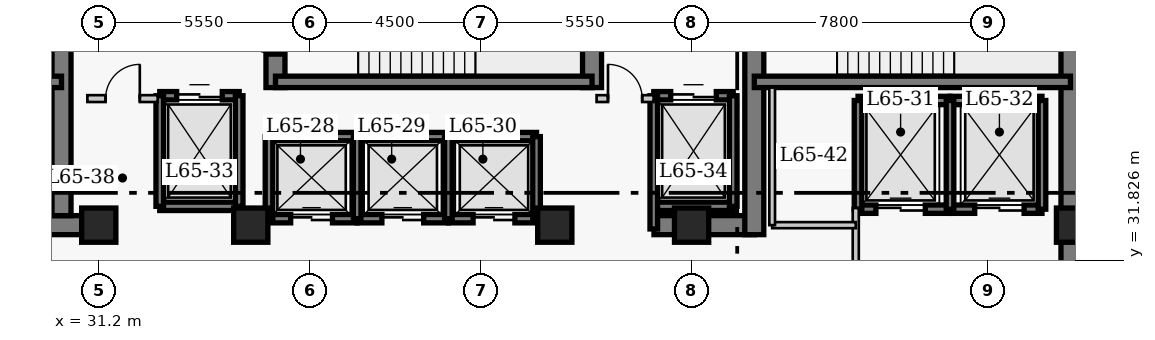
"""IFC4 building model, lengths in metres.
Left out: names, types, materials, properties, quantities, classifications, styles, units other than length and angle.
Written with IfcOpenShell. Run it as: python <this file> out.ifc"""

import sys

from ifc_helpers import new_model, si_unit, direction, frame, frame_2d, origin, origin_2d, place, context, subcontext, project, spatial, rectangle, extrude, element, fill, save


model = new_model("IFC4")
c1 = context("Model", 3, precision=1e-05, world=origin(), true_north=direction((0.0, 1.0)))
c2 = subcontext(c1, "Body", "Model", "MODEL_VIEW")
j1 = project(units=[si_unit("LENGTHUNIT", "METRE"), si_unit("PLANEANGLEUNIT", "RADIAN")], contexts=[c1])
p1 = place(None, origin())
s1 = spatial("IfcSite", under=j1, at=p1, CompositionType="ELEMENT")
p2 = place(p1, origin())
s2 = spatial("IfcBuilding", under=s1, at=p2, CompositionType="ELEMENT")
p3 = place(p2, frame((0.0, 0.0, 261.4)))
s3 = spatial("IfcBuildingStorey", under=s2, at=p3, CompositionType="ELEMENT", Elevation=261.4)
p4 = place(p3, frame((56.77, 27.05, 0.0), z_axis=(0.0, 0.0, 1.0), x_axis=(0.0, 1.0, 0.0)))
e1 = element("IfcWall", 1, at=p4, inside=s3, PredefinedType="SHEAR", context=c2, shape_type="SweptSolid", body=[
    extrude(rectangle(XDim=13.52, YDim=0.5, at=frame_2d((6.76, 0.0))), origin(), (0.0, 0.0, 1.0), 4.0),
])
p5 = place(p3, frame((28.45, 32.75, 0.0), z_axis=(0.0, 0.0, 1.0), x_axis=(1.0, 0.0, 0.0)))
e2 = element("IfcWall", 2, at=p5, inside=s3, PredefinedType="SHEAR", context=c2, shape_type="SweptSolid", body=[
    extrude(rectangle(XDim=2.4, YDim=0.5, at=frame_2d((1.2, 0.0))), origin(), (0.0, 0.0, 1.0), 4.0),
])
p6 = place(p3, frame((45.81, 32.75, 0.0), z_axis=(0.0, 0.0, 1.0), x_axis=(1.0, 0.0, 0.0)))
e3 = element("IfcWall", 3, at=p6, inside=s3, PredefinedType="SHEAR", context=c2, shape_type="SweptSolid", body=[
    extrude(rectangle(XDim=2.64, YDim=0.5, at=frame_2d((1.32, 0.0))), origin(), (0.0, 0.0, 1.0), 4.0),
])
p7 = place(p3, frame((30.22, 33.0, 0.0), z_axis=(0.0, 0.0, 1.0), x_axis=(0.0, 1.0, 0.0)))
e4 = element("IfcWall", 4, at=p7, inside=s3, PredefinedType="SHEAR", context=c2, shape_type="SweptSolid", body=[
    extrude(rectangle(XDim=7.32, YDim=0.5, at=frame_2d((3.66, 0.0))), origin(), (0.0, 0.0, 1.0), 4.0),
])
p8 = place(p3, frame((35.85, 36.37, 0.0), z_axis=(0.0, 0.0, 1.0), x_axis=(0.0, 1.0, 0.0)))
e5 = element("IfcWall", 5, at=p8, inside=s3, PredefinedType="SHEAR", context=c2, shape_type="SweptSolid", body=[
    extrude(rectangle(XDim=3.95, YDim=0.5, at=frame_2d((1.975, 0.0))), origin(), (0.0, 0.0, 1.0), 4.0),
])
p9 = place(p8, frame((0.88, 0.0, 0.0)))
e6 = element("IfcOpeningElement", 6, at=p9, cuts=e5, PredefinedType="OPENING", context=c2, shape_type="SweptSolid", body=[
    extrude(rectangle(XDim=1.1, YDim=2.15, at=frame_2d((0.55, 1.075))), frame((0.0, 0.26, 0.0), z_axis=(0.0, -1.0, 0.0), x_axis=(1.0, 0.0, 0.0)), (0.0, 0.0, 1.0), 0.52),
])
p10 = place(p3, frame((44.18, 36.37, 0.0), z_axis=(0.0, 0.0, 1.0), x_axis=(0.0, 1.0, 0.0)))
e7 = element("IfcWall", 7, at=p10, inside=s3, PredefinedType="SHEAR", context=c2, shape_type="SweptSolid", body=[
    extrude(rectangle(XDim=3.95, YDim=0.5, at=frame_2d((1.975, 0.0))), origin(), (0.0, 0.0, 1.0), 4.0),
])
p11 = place(p3, frame((48.45, 32.5, 0.0), z_axis=(0.0, 0.0, 1.0), x_axis=(0.0, 1.0, 0.0)))
e8 = element("IfcWall", 8, at=p11, inside=s3, PredefinedType="SHEAR", context=c2, shape_type="SweptSolid", body=[
    extrude(rectangle(XDim=7.82, YDim=0.5, at=frame_2d((3.91, 0.0))), origin(), (0.0, 0.0, 1.0), 4.0),
])
p12 = place(p11, frame((5.7, 0.0, 0.0)))
e9 = element("IfcOpeningElement", 9, at=p12, cuts=e8, PredefinedType="OPENING", context=c2, shape_type="SweptSolid", body=[
    extrude(rectangle(XDim=1.1, YDim=2.15, at=frame_2d((0.55, 1.075))), frame((0.0, 0.26, 0.0), z_axis=(0.0, -1.0, 0.0), x_axis=(1.0, 0.0, 0.0)), (0.0, 0.0, 1.0), 0.52),
])
p13 = place(p3, frame((21.9, 36.52, 0.0), z_axis=(0.0, 0.0, 1.0), x_axis=(1.0, 0.0, 0.0)))
e10 = element("IfcWall", 10, at=p13, inside=s3, PredefinedType="SHEAR", context=c2, shape_type="SweptSolid", body=[
    extrude(rectangle(XDim=8.32, YDim=0.3, at=frame_2d((4.16, 0.0))), origin(), (0.0, 0.0, 1.0), 4.0),
])
p14 = place(p13, frame((0.9, 0.0, 0.0)))
e11 = element("IfcOpeningElement", 11, at=p14, cuts=e10, PredefinedType="OPENING", context=c2, shape_type="SweptSolid", body=[
    extrude(rectangle(XDim=1.1, YDim=2.15, at=frame_2d((0.55, 1.075))), frame((0.0, 0.16, 0.0), z_axis=(0.0, -1.0, 0.0), x_axis=(1.0, 0.0, 0.0)), (0.0, 0.0, 1.0), 0.32),
])
p15 = place(p3, frame((35.85, 36.52, 0.0), z_axis=(0.0, 0.0, 1.0), x_axis=(1.0, 0.0, 0.0)))
e12 = element("IfcWall", 12, at=p15, inside=s3, PredefinedType="SHEAR", context=c2, shape_type="SweptSolid", body=[
    extrude(rectangle(XDim=8.33, YDim=0.3, at=frame_2d((4.165, 0.0))), origin(), (0.0, 0.0, 1.0), 4.0),
])
p16 = place(p3, frame((48.45, 36.52, 0.0), z_axis=(0.0, 0.0, 1.0), x_axis=(1.0, 0.0, 0.0)))
e13 = element("IfcWall", 13, at=p16, inside=s3, PredefinedType="SHEAR", context=c2, shape_type="SweptSolid", body=[
    extrude(rectangle(XDim=8.32, YDim=0.3, at=frame_2d((4.16, 0.0))), origin(), (0.0, 0.0, 1.0), 4.0),
])
for number, where, z_axis, x_axis in (
    (14, (31.2, 32.75, 0.0), (0.0, 0.0, 1.0), (1.0, 0.0, 0.0)),
    (15, (35.2, 32.75, 0.0), (0.0, 0.0, 1.0), (1.0, 0.0, 0.0)),
    (16, (43.2, 32.75, 0.0), (0.0, 0.0, 1.0), (1.0, 0.0, 0.0)),
    (17, (46.8, 32.75, 0.0), (0.0, 0.0, 1.0), (1.0, 0.0, 0.0)),
    (18, (56.85, 32.75, 0.0), (0.0, 0.0, 1.0), (1.0, 0.0, 0.0)),
):
    element("IfcColumn", number, at=place(p3, frame(where, z_axis=z_axis, x_axis=x_axis)), inside=s3, PredefinedType="COLUMN", context=c2, shape_type="SweptSolid", body=[
        extrude(rectangle(XDim=0.9, YDim=0.9, at=origin_2d()), origin(), (0.0, 0.0, 1.0), 4.0),
    ])
p17 = place(p3, frame((35.68, 35.08, 0.0), z_axis=(0.0, 0.0, 1.0), x_axis=(1.0, 0.0, 0.0)))
e19 = element("IfcWall", 19, at=p17, inside=s3, PredefinedType="SHEAR", context=c2, shape_type="SweptSolid", body=[
    extrude(rectangle(XDim=2.32, YDim=0.22, at=frame_2d((1.16, 0.0))), origin(), (0.0, 0.0, 1.0), 4.0),
])
p18 = place(p3, frame((35.68, 32.92, 0.0), z_axis=(0.0, 0.0, 1.0), x_axis=(1.0, 0.0, 0.0)))
e20 = element("IfcWall", 20, at=p18, inside=s3, PredefinedType="SHEAR", context=c2, shape_type="SweptSolid", body=[
    extrude(rectangle(XDim=2.32, YDim=0.22, at=frame_2d((1.16, 0.0))), origin(), (0.0, 0.0, 1.0), 4.0),
])
p19 = place(p18, frame((0.57, 0.0, 0.0)))
e21 = element("IfcOpeningElement", 21, at=p19, cuts=e20, PredefinedType="OPENING", context=c2, shape_type="SweptSolid", body=[
    extrude(rectangle(XDim=1.1, YDim=2.15, at=frame_2d((0.55, 1.075))), frame((0.0, 0.12, 0.0), z_axis=(0.0, -1.0, 0.0), x_axis=(1.0, 0.0, 0.0)), (0.0, 0.0, 1.0), 0.24),
])
p20 = place(p3, frame((35.68, 32.92, 0.0), z_axis=(0.0, 0.0, 1.0), x_axis=(0.0, 1.0, 0.0)))
e22 = element("IfcWall", 22, at=p20, inside=s3, PredefinedType="SHEAR", context=c2, shape_type="SweptSolid", body=[
    extrude(rectangle(XDim=2.16, YDim=0.2, at=frame_2d((1.08, 0.0))), origin(), (0.0, 0.0, 1.0), 4.0),
])
p21 = place(p3, frame((38.0, 35.08, 0.0), z_axis=(0.0, 0.0, 1.0), x_axis=(1.0, 0.0, 0.0)))
e23 = element("IfcWall", 23, at=p21, inside=s3, PredefinedType="SHEAR", context=c2, shape_type="SweptSolid", body=[
    extrude(rectangle(XDim=2.4, YDim=0.22, at=frame_2d((1.2, 0.0))), origin(), (0.0, 0.0, 1.0), 4.0),
])
p22 = place(p3, frame((38.0, 32.92, 0.0), z_axis=(0.0, 0.0, 1.0), x_axis=(1.0, 0.0, 0.0)))
e24 = element("IfcWall", 24, at=p22, inside=s3, PredefinedType="SHEAR", context=c2, shape_type="SweptSolid", body=[
    extrude(rectangle(XDim=2.4, YDim=0.22, at=frame_2d((1.2, 0.0))), origin(), (0.0, 0.0, 1.0), 4.0),
])
p23 = place(p22, frame((0.65, 0.0, 0.0)))
e25 = element("IfcOpeningElement", 25, at=p23, cuts=e24, PredefinedType="OPENING", context=c2, shape_type="SweptSolid", body=[
    extrude(rectangle(XDim=1.1, YDim=2.15, at=frame_2d((0.55, 1.075))), frame((0.0, 0.12, 0.0), z_axis=(0.0, -1.0, 0.0), x_axis=(1.0, 0.0, 0.0)), (0.0, 0.0, 1.0), 0.24),
])
p24 = place(p3, frame((38.0, 32.92, 0.0), z_axis=(0.0, 0.0, 1.0), x_axis=(0.0, 1.0, 0.0)))
e26 = element("IfcWall", 26, at=p24, inside=s3, PredefinedType="SHEAR", context=c2, shape_type="SweptSolid", body=[
    extrude(rectangle(XDim=2.16, YDim=0.2, at=frame_2d((1.08, 0.0))), origin(), (0.0, 0.0, 1.0), 4.0),
])
p25 = place(p3, frame((40.4, 35.08, 0.0), z_axis=(0.0, 0.0, 1.0), x_axis=(1.0, 0.0, 0.0)))
e27 = element("IfcWall", 27, at=p25, inside=s3, PredefinedType="SHEAR", context=c2, shape_type="SweptSolid", body=[
    extrude(rectangle(XDim=2.32, YDim=0.22, at=frame_2d((1.16, 0.0))), origin(), (0.0, 0.0, 1.0), 4.0),
])
p26 = place(p3, frame((40.4, 32.92, 0.0), z_axis=(0.0, 0.0, 1.0), x_axis=(1.0, 0.0, 0.0)))
e28 = element("IfcWall", 28, at=p26, inside=s3, PredefinedType="SHEAR", context=c2, shape_type="SweptSolid", body=[
    extrude(rectangle(XDim=2.32, YDim=0.22, at=frame_2d((1.16, 0.0))), origin(), (0.0, 0.0, 1.0), 4.0),
])
p27 = place(p26, frame((0.65, 0.0, 0.0)))
e29 = element("IfcOpeningElement", 29, at=p27, cuts=e28, PredefinedType="OPENING", context=c2, shape_type="SweptSolid", body=[
    extrude(rectangle(XDim=1.1, YDim=2.15, at=frame_2d((0.55, 1.075))), frame((0.0, 0.12, 0.0), z_axis=(0.0, -1.0, 0.0), x_axis=(1.0, 0.0, 0.0)), (0.0, 0.0, 1.0), 0.24),
])
for number, where, z_axis, x_axis in (
    (30, (40.4, 32.92, 0.0), (0.0, 0.0, 1.0), (0.0, 1.0, 0.0)),
    (31, (42.72, 32.92, 0.0), (0.0, 0.0, 1.0), (0.0, 1.0, 0.0)),
):
    element("IfcWall", number, at=place(p3, frame(where, z_axis=z_axis, x_axis=x_axis)), inside=s3, PredefinedType="SHEAR", context=c2, shape_type="SweptSolid", body=[
        extrude(rectangle(XDim=2.16, YDim=0.2, at=frame_2d((1.08, 0.0))), origin(), (0.0, 0.0, 1.0), 4.0),
    ])
p28 = place(p3, frame((51.18, 36.03, 0.0), z_axis=(0.0, 0.0, 1.0), x_axis=(1.0, 0.0, 0.0)))
e32 = element("IfcWall", 32, at=p28, inside=s3, PredefinedType="SHEAR", context=c2, shape_type="SweptSolid", body=[
    extrude(rectangle(XDim=2.42, YDim=0.22, at=frame_2d((1.21, 0.0))), origin(), (0.0, 0.0, 1.0), 4.0),
])
p29 = place(p3, frame((51.18, 33.17, 0.0), z_axis=(0.0, 0.0, 1.0), x_axis=(1.0, 0.0, 0.0)))
e33 = element("IfcWall", 33, at=p29, inside=s3, PredefinedType="SHEAR", context=c2, shape_type="SweptSolid", body=[
    extrude(rectangle(XDim=2.42, YDim=0.22, at=frame_2d((1.21, 0.0))), origin(), (0.0, 0.0, 1.0), 4.0),
])
p30 = place(p29, frame((0.47, 0.0, 0.0)))
e34 = element("IfcOpeningElement", 34, at=p30, cuts=e33, PredefinedType="OPENING", context=c2, shape_type="SweptSolid", body=[
    extrude(rectangle(XDim=1.3, YDim=2.15, at=frame_2d((0.65, 1.075))), frame((0.0, 0.12, 0.0), z_axis=(0.0, -1.0, 0.0), x_axis=(1.0, 0.0, 0.0)), (0.0, 0.0, 1.0), 0.24),
])
p31 = place(p3, frame((51.18, 33.17, 0.0), z_axis=(0.0, 0.0, 1.0), x_axis=(0.0, 1.0, 0.0)))
e35 = element("IfcWall", 35, at=p31, inside=s3, PredefinedType="SHEAR", context=c2, shape_type="SweptSolid", body=[
    extrude(rectangle(XDim=2.86, YDim=0.2, at=frame_2d((1.43, 0.0))), origin(), (0.0, 0.0, 1.0), 4.0),
])
p32 = place(p3, frame((53.6, 36.03, 0.0), z_axis=(0.0, 0.0, 1.0), x_axis=(1.0, 0.0, 0.0)))
e36 = element("IfcWall", 36, at=p32, inside=s3, PredefinedType="SHEAR", context=c2, shape_type="SweptSolid", body=[
    extrude(rectangle(XDim=2.42, YDim=0.22, at=frame_2d((1.21, 0.0))), origin(), (0.0, 0.0, 1.0), 4.0),
])
p33 = place(p3, frame((53.6, 33.17, 0.0), z_axis=(0.0, 0.0, 1.0), x_axis=(1.0, 0.0, 0.0)))
e37 = element("IfcWall", 37, at=p33, inside=s3, PredefinedType="SHEAR", context=c2, shape_type="SweptSolid", body=[
    extrude(rectangle(XDim=2.42, YDim=0.22, at=frame_2d((1.21, 0.0))), origin(), (0.0, 0.0, 1.0), 4.0),
])
p34 = place(p33, frame((0.65, 0.0, 0.0)))
e38 = element("IfcOpeningElement", 38, at=p34, cuts=e37, PredefinedType="OPENING", context=c2, shape_type="SweptSolid", body=[
    extrude(rectangle(XDim=1.3, YDim=2.15, at=frame_2d((0.65, 1.075))), frame((0.0, 0.12, 0.0), z_axis=(0.0, -1.0, 0.0), x_axis=(1.0, 0.0, 0.0)), (0.0, 0.0, 1.0), 0.24),
])
for number, where, z_axis, x_axis in (
    (39, (53.6, 33.17, 0.0), (0.0, 0.0, 1.0), (0.0, 1.0, 0.0)),
    (40, (56.02, 33.17, 0.0), (0.0, 0.0, 1.0), (0.0, 1.0, 0.0)),
):
    element("IfcWall", number, at=place(p3, frame(where, z_axis=z_axis, x_axis=x_axis)), inside=s3, PredefinedType="SHEAR", context=c2, shape_type="SweptSolid", body=[
        extrude(rectangle(XDim=2.86, YDim=0.2, at=frame_2d((1.43, 0.0))), origin(), (0.0, 0.0, 1.0), 4.0),
    ])
p35 = place(p3, frame((32.805, 36.155, 0.0), z_axis=(0.0, 0.0, 1.0), x_axis=(1.0, 0.0, 0.0)))
e41 = element("IfcWall", 41, at=p35, inside=s3, PredefinedType="SHEAR", context=c2, shape_type="SweptSolid", body=[
    extrude(rectangle(XDim=2.09, YDim=0.22, at=frame_2d((1.045, 0.0))), origin(), (0.0, 0.0, 1.0), 4.0),
])
p36 = place(p35, frame((0.445, 0.0, 0.0)))
e42 = element("IfcOpeningElement", 42, at=p36, cuts=e41, PredefinedType="OPENING", context=c2, shape_type="SweptSolid", body=[
    extrude(rectangle(XDim=1.2, YDim=2.15, at=frame_2d((0.6, 1.075))), frame((0.0, 0.12, 0.0), z_axis=(0.0, -1.0, 0.0), x_axis=(1.0, 0.0, 0.0)), (0.0, 0.0, 1.0), 0.24),
])
p37 = place(p3, frame((32.805, 33.245, 0.0), z_axis=(0.0, 0.0, 1.0), x_axis=(1.0, 0.0, 0.0)))
e43 = element("IfcWall", 43, at=p37, inside=s3, PredefinedType="SHEAR", context=c2, shape_type="SweptSolid", body=[
    extrude(rectangle(XDim=2.09, YDim=0.22, at=frame_2d((1.045, 0.0))), origin(), (0.0, 0.0, 1.0), 4.0),
])
for number, where, z_axis, x_axis in (
    (44, (32.805, 33.245, 0.0), (0.0, 0.0, 1.0), (0.0, 1.0, 0.0)),
    (45, (34.895, 33.245, 0.0), (0.0, 0.0, 1.0), (0.0, 1.0, 0.0)),
):
    element("IfcWall", number, at=place(p3, frame(where, z_axis=z_axis, x_axis=x_axis)), inside=s3, PredefinedType="SHEAR", context=c2, shape_type="SweptSolid", body=[
        extrude(rectangle(XDim=2.91, YDim=0.2, at=frame_2d((1.455, 0.0))), origin(), (0.0, 0.0, 1.0), 4.0),
    ])
p38 = place(p3, frame((45.805, 36.155, 0.0), z_axis=(0.0, 0.0, 1.0), x_axis=(1.0, 0.0, 0.0)))
e46 = element("IfcWall", 46, at=p38, inside=s3, PredefinedType="SHEAR", context=c2, shape_type="SweptSolid", body=[
    extrude(rectangle(XDim=2.09, YDim=0.22, at=frame_2d((1.045, 0.0))), origin(), (0.0, 0.0, 1.0), 4.0),
])
p39 = place(p38, frame((0.445, 0.0, 0.0)))
e47 = element("IfcOpeningElement", 47, at=p39, cuts=e46, PredefinedType="OPENING", context=c2, shape_type="SweptSolid", body=[
    extrude(rectangle(XDim=1.2, YDim=2.15, at=frame_2d((0.6, 1.075))), frame((0.0, 0.12, 0.0), z_axis=(0.0, -1.0, 0.0), x_axis=(1.0, 0.0, 0.0)), (0.0, 0.0, 1.0), 0.24),
])
p40 = place(p3, frame((45.805, 33.245, 0.0), z_axis=(0.0, 0.0, 1.0), x_axis=(1.0, 0.0, 0.0)))
e48 = element("IfcWall", 48, at=p40, inside=s3, PredefinedType="SHEAR", context=c2, shape_type="SweptSolid", body=[
    extrude(rectangle(XDim=2.09, YDim=0.22, at=frame_2d((1.045, 0.0))), origin(), (0.0, 0.0, 1.0), 4.0),
])
p41 = place(p3, frame((45.805, 32.65, 0.0), z_axis=(0.0, 0.0, 1.0), x_axis=(0.0, 1.0, 0.0)))
e49 = element("IfcWall", 49, at=p41, inside=s3, PredefinedType="SHEAR", context=c2, shape_type="SweptSolid", body=[
    extrude(rectangle(XDim=3.505, YDim=0.2, at=frame_2d((1.752, 0.0))), origin(), (0.0, 0.0, 1.0), 4.0),
])
p42 = place(p3, frame((47.895, 33.245, 0.0), z_axis=(0.0, 0.0, 1.0), x_axis=(0.0, 1.0, 0.0)))
e50 = element("IfcWall", 50, at=p42, inside=s3, PredefinedType="SHEAR", context=c2, shape_type="SweptSolid", body=[
    extrude(rectangle(XDim=2.91, YDim=0.2, at=frame_2d((1.455, 0.0))), origin(), (0.0, 0.0, 1.0), 4.0),
])
p43 = place(p3, frame((30.9, 36.08, 0.0), z_axis=(0.0, 0.0, 1.0), x_axis=(1.0, 0.0, 0.0)))
e51 = element("IfcWall", 51, at=p43, inside=s3, PredefinedType="PARTITIONING", context=c2, shape_type="SweptSolid", body=[
    extrude(rectangle(XDim=1.85, YDim=0.18, at=frame_2d((0.925, 0.0))), origin(), (0.0, 0.0, 1.0), 3.76),
])
p44 = place(p43, frame((0.48, 0.0, 0.0)))
e52 = element("IfcOpeningElement", 52, at=p44, cuts=e51, PredefinedType="OPENING", context=c2, shape_type="SweptSolid", body=[
    extrude(rectangle(XDim=0.9, YDim=2.15, at=frame_2d((0.45, 1.075))), frame((0.0, 0.1, 0.0), z_axis=(0.0, -1.0, 0.0), x_axis=(1.0, 0.0, 0.0)), (0.0, 0.0, 1.0), 0.2),
])
p45 = place(p3, frame((44.3, 36.08, 0.0), z_axis=(0.0, 0.0, 1.0), x_axis=(1.0, 0.0, 0.0)))
e53 = element("IfcWall", 53, at=p45, inside=s3, PredefinedType="PARTITIONING", context=c2, shape_type="SweptSolid", body=[
    extrude(rectangle(XDim=1.5, YDim=0.18, at=frame_2d((0.75, 0.0))), origin(), (0.0, 0.0, 1.0), 3.76),
])
p46 = place(p45, frame((0.3, 0.0, 0.0)))
e54 = element("IfcOpeningElement", 54, at=p46, cuts=e53, PredefinedType="OPENING", context=c2, shape_type="SweptSolid", body=[
    extrude(rectangle(XDim=0.9, YDim=2.15, at=frame_2d((0.45, 1.075))), frame((0.0, 0.1, 0.0), z_axis=(0.0, -1.0, 0.0), x_axis=(1.0, 0.0, 0.0)), (0.0, 0.0, 1.0), 0.2),
])
p47 = place(p3, frame((51.12, 29.5, 0.0), z_axis=(0.0, 0.0, 1.0), x_axis=(0.0, 1.0, 0.0)))
e55 = element("IfcWall", 55, at=p47, inside=s3, PredefinedType="PARTITIONING", context=c2, shape_type="SweptSolid", body=[
    extrude(rectangle(XDim=3.7, YDim=0.16, at=frame_2d((1.85, 0.0))), origin(), (0.0, 0.0, 1.0), 3.76),
])
p48 = place(p47, frame((0.9, 0.0, 0.0)))
e56 = element("IfcOpeningElement", 56, at=p48, cuts=e55, PredefinedType="OPENING", context=c2, shape_type="SweptSolid", body=[
    extrude(rectangle(XDim=1.1, YDim=2.15, at=frame_2d((0.55, 1.075))), frame((0.0, 0.09, 0.0), z_axis=(0.0, -1.0, 0.0), x_axis=(1.0, 0.0, 0.0)), (0.0, 0.0, 1.0), 0.18),
])
p49 = place(p3, frame((48.92, 32.75, 0.0), z_axis=(0.0, 0.0, 1.0), x_axis=(1.0, 0.0, 0.0)))
e57 = element("IfcWall", 57, at=p49, inside=s3, PredefinedType="PARTITIONING", context=c2, shape_type="SweptSolid", body=[
    extrude(rectangle(XDim=2.2, YDim=0.16, at=frame_2d((1.1, 0.0))), origin(), (0.0, 0.0, 1.0), 3.76),
])
p50 = place(p3, frame((48.92, 32.75, 0.0), z_axis=(0.0, 0.0, 1.0), x_axis=(0.0, 1.0, 0.0)))
e58 = element("IfcWall", 58, at=p50, inside=s3, PredefinedType="PARTITIONING", context=c2, shape_type="SweptSolid", body=[
    extrude(rectangle(XDim=3.62, YDim=0.15, at=frame_2d((1.81, 0.0))), origin(), (0.0, 0.0, 1.0), 3.76),
])
p51 = place(p19, origin())
e59 = element("IfcDoor", 59, at=p51, inside=s3, OperationType="DOUBLE_DOOR_SLIDING", PredefinedType="DOOR", context=c2, shape_type="SweptSolid", body=[
    extrude(rectangle(XDim=1.1, YDim=2.15, at=frame_2d((0.55, 1.075))), frame((0.0, 0.025, 0.0), z_axis=(0.0, -1.0, 0.0), x_axis=(1.0, 0.0, 0.0)), (0.0, 0.0, 1.0), 0.05),
])
fill(e21, e59)
p52 = place(p23, origin())
e60 = element("IfcDoor", 60, at=p52, inside=s3, OperationType="DOUBLE_DOOR_SLIDING", PredefinedType="DOOR", context=c2, shape_type="SweptSolid", body=[
    extrude(rectangle(XDim=1.1, YDim=2.15, at=frame_2d((0.55, 1.075))), frame((0.0, 0.025, 0.0), z_axis=(0.0, -1.0, 0.0), x_axis=(1.0, 0.0, 0.0)), (0.0, 0.0, 1.0), 0.05),
])
fill(e25, e60)
p53 = place(p27, origin())
e61 = element("IfcDoor", 61, at=p53, inside=s3, OperationType="DOUBLE_DOOR_SLIDING", PredefinedType="DOOR", context=c2, shape_type="SweptSolid", body=[
    extrude(rectangle(XDim=1.1, YDim=2.15, at=frame_2d((0.55, 1.075))), frame((0.0, 0.025, 0.0), z_axis=(0.0, -1.0, 0.0), x_axis=(1.0, 0.0, 0.0)), (0.0, 0.0, 1.0), 0.05),
])
fill(e29, e61)
p54 = place(p30, origin())
e62 = element("IfcDoor", 62, at=p54, inside=s3, OperationType="DOUBLE_DOOR_SLIDING", PredefinedType="DOOR", context=c2, shape_type="SweptSolid", body=[
    extrude(rectangle(XDim=1.3, YDim=2.15, at=frame_2d((0.65, 1.075))), frame((0.0, 0.025, 0.0), z_axis=(0.0, -1.0, 0.0), x_axis=(1.0, 0.0, 0.0)), (0.0, 0.0, 1.0), 0.05),
])
fill(e34, e62)
p55 = place(p34, origin())
e63 = element("IfcDoor", 63, at=p55, inside=s3, OperationType="DOUBLE_DOOR_SLIDING", PredefinedType="DOOR", context=c2, shape_type="SweptSolid", body=[
    extrude(rectangle(XDim=1.3, YDim=2.15, at=frame_2d((0.65, 1.075))), frame((0.0, 0.025, 0.0), z_axis=(0.0, -1.0, 0.0), x_axis=(1.0, 0.0, 0.0)), (0.0, 0.0, 1.0), 0.05),
])
fill(e38, e63)
p56 = place(p36, origin())
e64 = element("IfcDoor", 64, at=p56, inside=s3, OperationType="DOUBLE_DOOR_SLIDING", PredefinedType="DOOR", context=c2, shape_type="SweptSolid", body=[
    extrude(rectangle(XDim=1.2, YDim=2.15, at=frame_2d((0.6, 1.075))), frame((0.0, 0.025, 0.0), z_axis=(0.0, -1.0, 0.0), x_axis=(1.0, 0.0, 0.0)), (0.0, 0.0, 1.0), 0.05),
])
fill(e42, e64)
p57 = place(p39, origin())
e65 = element("IfcDoor", 65, at=p57, inside=s3, OperationType="DOUBLE_DOOR_SLIDING", PredefinedType="DOOR", context=c2, shape_type="SweptSolid", body=[
    extrude(rectangle(XDim=1.2, YDim=2.15, at=frame_2d((0.6, 1.075))), frame((0.0, 0.025, 0.0), z_axis=(0.0, -1.0, 0.0), x_axis=(1.0, 0.0, 0.0)), (0.0, 0.0, 1.0), 0.05),
])
fill(e47, e65)
p58 = place(p44, origin())
e66 = element("IfcDoor", 66, at=p58, inside=s3, OperationType="SINGLE_SWING_RIGHT", PredefinedType="DOOR", context=c2, shape_type="SweptSolid", body=[
    extrude(rectangle(XDim=0.9, YDim=2.15, at=frame_2d((0.45, 1.075))), frame((0.0, 0.025, 0.0), z_axis=(0.0, -1.0, 0.0), x_axis=(1.0, 0.0, 0.0)), (0.0, 0.0, 1.0), 0.05),
])
fill(e52, e66)
p59 = place(p46, origin())
e67 = element("IfcDoor", 67, at=p59, inside=s3, OperationType="SINGLE_SWING_LEFT", PredefinedType="DOOR", context=c2, shape_type="SweptSolid", body=[
    extrude(rectangle(XDim=0.9, YDim=2.15, at=frame_2d((0.45, 1.075))), frame((0.0, 0.025, 0.0), z_axis=(0.0, -1.0, 0.0), x_axis=(1.0, 0.0, 0.0)), (0.0, 0.0, 1.0), 0.05),
])
fill(e54, e67)
p60 = place(p9, origin())
e68 = element("IfcDoor", 68, at=p60, inside=s3, OperationType="SINGLE_SWING_RIGHT", PredefinedType="DOOR", context=c2, shape_type="SweptSolid", body=[
    extrude(rectangle(XDim=1.1, YDim=2.15, at=frame_2d((0.55, 1.075))), frame((0.0, 0.025, 0.0), z_axis=(0.0, -1.0, 0.0), x_axis=(1.0, 0.0, 0.0)), (0.0, 0.0, 1.0), 0.05),
])
fill(e6, e68)
save(model, sys.argv[1])
